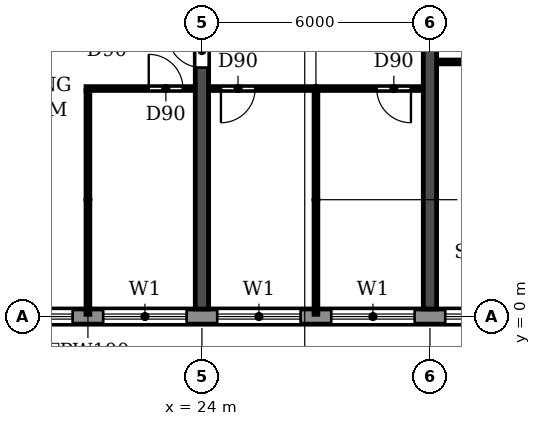
"""IFC4 building model, lengths in metres.
Left out: names, types, materials, properties, quantities, classifications, styles, units other than length and angle.
Written with IfcOpenShell. Run it as: python <this file> out.ifc"""

import sys

from ifc_helpers import new_model, si_unit, direction, frame, frame_2d, origin, place, context, subcontext, project, spatial, rectangle, extrude, element, fill, save


model = new_model("IFC4")
c1 = context("Model", 3, precision=1e-05, world=origin(), true_north=direction((0.0, 1.0)))
c2 = subcontext(c1, "Body", "Model", "MODEL_VIEW")
j1 = project(units=[si_unit("LENGTHUNIT", "METRE"), si_unit("PLANEANGLEUNIT", "RADIAN")], contexts=[c1])
p1 = place(None, origin())
s1 = spatial("IfcSite", under=j1, at=p1, CompositionType="ELEMENT")
p2 = place(p1, origin())
s2 = spatial("IfcBuilding", under=s1, at=p2, CompositionType="ELEMENT")
p3 = place(p2, frame((0.0, 0.0, 102.6)))
s3 = spatial("IfcBuildingStorey", under=s2, at=p3, CompositionType="ELEMENT", Elevation=102.6)
p4 = place(p3, frame((24.0, 0.2, 0.0), z_axis=(0.0, 0.0, 1.0), x_axis=(0.0, 1.0, 0.0)))
e1 = element("IfcWall", 1, at=p4, inside=s3, PredefinedType="SHEAR", context=c2, shape_type="SweptSolid", body=[
    extrude(rectangle(XDim=11.675, YDim=0.35, at=frame_2d((5.837, 0.0))), origin(), (0.0, 0.0, 1.0), 3.0),
])
p5 = place(p4, frame((6.35, 0.0, 0.0)))
e2 = element("IfcOpeningElement", 2, at=p5, cuts=e1, PredefinedType="OPENING", context=c2, shape_type="SweptSolid", body=[
    extrude(rectangle(XDim=0.9, YDim=2.1, at=frame_2d((0.45, 1.05))), frame((0.0, 0.185, 0.0), z_axis=(0.0, -1.0, 0.0), x_axis=(1.0, 0.0, 0.0)), (0.0, 0.0, 1.0), 0.37),
])
p6 = place(p3, frame((30.0, 0.2, 0.0), z_axis=(0.0, 0.0, 1.0), x_axis=(0.0, 1.0, 0.0)))
e3 = element("IfcWall", 3, at=p6, inside=s3, PredefinedType="SHEAR", context=c2, shape_type="SweptSolid", body=[
    extrude(rectangle(XDim=11.675, YDim=0.35, at=frame_2d((5.837, 0.0))), origin(), (0.0, 0.0, 1.0), 3.0),
])
p7 = place(p3, frame((10.683, 0.0, 0.0), z_axis=(0.0, 0.0, 1.0), x_axis=(1.0, 0.0, 0.0)))
e4 = element("IfcWall", 4, at=p7, inside=s3, PredefinedType="STANDARD", context=c2, shape_type="SweptSolid", body=[
    extrude(rectangle(XDim=80.634, YDim=0.4, at=frame_2d((40.317, 0.0))), origin(), (0.0, 0.0, 1.0), 3.0),
])
p8 = place(p7, frame((1.717, 0.0, 0.9)))
e5 = element("IfcOpeningElement", 5, at=p8, cuts=e4, PredefinedType="OPENING", context=c2, shape_type="SweptSolid", body=[
    extrude(rectangle(XDim=2.2, YDim=1.5, at=frame_2d((1.1, 0.75))), frame((0.0, 0.21, 0.0), z_axis=(0.0, -1.0, 0.0), x_axis=(1.0, 0.0, 0.0)), (0.0, 0.0, 1.0), 0.42),
])
p9 = place(p7, frame((4.917, 0.0, 0.0)))
e6 = element("IfcOpeningElement", 6, at=p9, cuts=e4, PredefinedType="OPENING", context=c2, shape_type="SweptSolid", body=[
    extrude(rectangle(XDim=1.8, YDim=2.4, at=frame_2d((0.9, 1.2))), frame((0.0, 0.21, 0.0), z_axis=(0.0, -1.0, 0.0), x_axis=(1.0, 0.0, 0.0)), (0.0, 0.0, 1.0), 0.42),
])
p10 = place(p7, frame((7.717, 0.0, 0.9)))
e7 = element("IfcOpeningElement", 7, at=p10, cuts=e4, PredefinedType="OPENING", context=c2, shape_type="SweptSolid", body=[
    extrude(rectangle(XDim=2.2, YDim=1.5, at=frame_2d((1.1, 0.75))), frame((0.0, 0.21, 0.0), z_axis=(0.0, -1.0, 0.0), x_axis=(1.0, 0.0, 0.0)), (0.0, 0.0, 1.0), 0.42),
])
p11 = place(p7, frame((10.717, 0.0, 0.9)))
e8 = element("IfcOpeningElement", 8, at=p11, cuts=e4, PredefinedType="OPENING", context=c2, shape_type="SweptSolid", body=[
    extrude(rectangle(XDim=2.2, YDim=1.5, at=frame_2d((1.1, 0.75))), frame((0.0, 0.21, 0.0), z_axis=(0.0, -1.0, 0.0), x_axis=(1.0, 0.0, 0.0)), (0.0, 0.0, 1.0), 0.42),
])
p12 = place(p7, frame((13.717, 0.0, 0.9)))
e9 = element("IfcOpeningElement", 9, at=p12, cuts=e4, PredefinedType="OPENING", context=c2, shape_type="SweptSolid", body=[
    extrude(rectangle(XDim=2.2, YDim=1.5, at=frame_2d((1.1, 0.75))), frame((0.0, 0.21, 0.0), z_axis=(0.0, -1.0, 0.0), x_axis=(1.0, 0.0, 0.0)), (0.0, 0.0, 1.0), 0.42),
])
p13 = place(p7, frame((16.717, 0.0, 0.9)))
e10 = element("IfcOpeningElement", 10, at=p13, cuts=e4, PredefinedType="OPENING", context=c2, shape_type="SweptSolid", body=[
    extrude(rectangle(XDim=2.2, YDim=1.5, at=frame_2d((1.1, 0.75))), frame((0.0, 0.21, 0.0), z_axis=(0.0, -1.0, 0.0), x_axis=(1.0, 0.0, 0.0)), (0.0, 0.0, 1.0), 0.42),
])
p14 = place(p7, frame((19.717, 0.0, 0.9)))
e11 = element("IfcOpeningElement", 11, at=p14, cuts=e4, PredefinedType="OPENING", context=c2, shape_type="SweptSolid", body=[
    extrude(rectangle(XDim=2.2, YDim=1.5, at=frame_2d((1.1, 0.75))), frame((0.0, 0.21, 0.0), z_axis=(0.0, -1.0, 0.0), x_axis=(1.0, 0.0, 0.0)), (0.0, 0.0, 1.0), 0.42),
])
p15 = place(p7, frame((22.717, 0.0, 0.9)))
e12 = element("IfcOpeningElement", 12, at=p15, cuts=e4, PredefinedType="OPENING", context=c2, shape_type="SweptSolid", body=[
    extrude(rectangle(XDim=2.2, YDim=1.5, at=frame_2d((1.1, 0.75))), frame((0.0, 0.21, 0.0), z_axis=(0.0, -1.0, 0.0), x_axis=(1.0, 0.0, 0.0)), (0.0, 0.0, 1.0), 0.42),
])
p16 = place(p7, frame((25.717, 0.0, 0.9)))
e13 = element("IfcOpeningElement", 13, at=p16, cuts=e4, PredefinedType="OPENING", context=c2, shape_type="SweptSolid", body=[
    extrude(rectangle(XDim=2.2, YDim=1.5, at=frame_2d((1.1, 0.75))), frame((0.0, 0.21, 0.0), z_axis=(0.0, -1.0, 0.0), x_axis=(1.0, 0.0, 0.0)), (0.0, 0.0, 1.0), 0.42),
])
p17 = place(p7, frame((28.917, 0.0, 0.0)))
e14 = element("IfcOpeningElement", 14, at=p17, cuts=e4, PredefinedType="OPENING", context=c2, shape_type="SweptSolid", body=[
    extrude(rectangle(XDim=1.8, YDim=2.4, at=frame_2d((0.9, 1.2))), frame((0.0, 0.21, 0.0), z_axis=(0.0, -1.0, 0.0), x_axis=(1.0, 0.0, 0.0)), (0.0, 0.0, 1.0), 0.42),
])
p18 = place(p7, frame((31.717, 0.0, 0.9)))
e15 = element("IfcOpeningElement", 15, at=p18, cuts=e4, PredefinedType="OPENING", context=c2, shape_type="SweptSolid", body=[
    extrude(rectangle(XDim=2.2, YDim=1.5, at=frame_2d((1.1, 0.75))), frame((0.0, 0.21, 0.0), z_axis=(0.0, -1.0, 0.0), x_axis=(1.0, 0.0, 0.0)), (0.0, 0.0, 1.0), 0.42),
])
p19 = place(p7, frame((34.717, 0.0, 0.9)))
e16 = element("IfcOpeningElement", 16, at=p19, cuts=e4, PredefinedType="OPENING", context=c2, shape_type="SweptSolid", body=[
    extrude(rectangle(XDim=2.2, YDim=1.5, at=frame_2d((1.1, 0.75))), frame((0.0, 0.21, 0.0), z_axis=(0.0, -1.0, 0.0), x_axis=(1.0, 0.0, 0.0)), (0.0, 0.0, 1.0), 0.42),
])
p20 = place(p7, frame((37.717, 0.0, 0.9)))
e17 = element("IfcOpeningElement", 17, at=p20, cuts=e4, PredefinedType="OPENING", context=c2, shape_type="SweptSolid", body=[
    extrude(rectangle(XDim=2.2, YDim=1.5, at=frame_2d((1.1, 0.75))), frame((0.0, 0.21, 0.0), z_axis=(0.0, -1.0, 0.0), x_axis=(1.0, 0.0, 0.0)), (0.0, 0.0, 1.0), 0.42),
])
p21 = place(p7, frame((40.717, 0.0, 0.9)))
e18 = element("IfcOpeningElement", 18, at=p21, cuts=e4, PredefinedType="OPENING", context=c2, shape_type="SweptSolid", body=[
    extrude(rectangle(XDim=2.2, YDim=1.5, at=frame_2d((1.1, 0.75))), frame((0.0, 0.21, 0.0), z_axis=(0.0, -1.0, 0.0), x_axis=(1.0, 0.0, 0.0)), (0.0, 0.0, 1.0), 0.42),
])
p22 = place(p7, frame((43.717, 0.0, 0.9)))
e19 = element("IfcOpeningElement", 19, at=p22, cuts=e4, PredefinedType="OPENING", context=c2, shape_type="SweptSolid", body=[
    extrude(rectangle(XDim=2.2, YDim=1.5, at=frame_2d((1.1, 0.75))), frame((0.0, 0.21, 0.0), z_axis=(0.0, -1.0, 0.0), x_axis=(1.0, 0.0, 0.0)), (0.0, 0.0, 1.0), 0.42),
])
p23 = place(p7, frame((46.717, 0.0, 0.9)))
e20 = element("IfcOpeningElement", 20, at=p23, cuts=e4, PredefinedType="OPENING", context=c2, shape_type="SweptSolid", body=[
    extrude(rectangle(XDim=2.2, YDim=1.5, at=frame_2d((1.1, 0.75))), frame((0.0, 0.21, 0.0), z_axis=(0.0, -1.0, 0.0), x_axis=(1.0, 0.0, 0.0)), (0.0, 0.0, 1.0), 0.42),
])
p24 = place(p7, frame((49.917, 0.0, 0.0)))
e21 = element("IfcOpeningElement", 21, at=p24, cuts=e4, PredefinedType="OPENING", context=c2, shape_type="SweptSolid", body=[
    extrude(rectangle(XDim=1.8, YDim=2.4, at=frame_2d((0.9, 1.2))), frame((0.0, 0.21, 0.0), z_axis=(0.0, -1.0, 0.0), x_axis=(1.0, 0.0, 0.0)), (0.0, 0.0, 1.0), 0.42),
])
p25 = place(p7, frame((52.717, 0.0, 0.9)))
e22 = element("IfcOpeningElement", 22, at=p25, cuts=e4, PredefinedType="OPENING", context=c2, shape_type="SweptSolid", body=[
    extrude(rectangle(XDim=2.2, YDim=1.5, at=frame_2d((1.1, 0.75))), frame((0.0, 0.21, 0.0), z_axis=(0.0, -1.0, 0.0), x_axis=(1.0, 0.0, 0.0)), (0.0, 0.0, 1.0), 0.42),
])
p26 = place(p7, frame((55.717, 0.0, 0.9)))
e23 = element("IfcOpeningElement", 23, at=p26, cuts=e4, PredefinedType="OPENING", context=c2, shape_type="SweptSolid", body=[
    extrude(rectangle(XDim=2.2, YDim=1.5, at=frame_2d((1.1, 0.75))), frame((0.0, 0.21, 0.0), z_axis=(0.0, -1.0, 0.0), x_axis=(1.0, 0.0, 0.0)), (0.0, 0.0, 1.0), 0.42),
])
p27 = place(p7, frame((58.717, 0.0, 0.9)))
e24 = element("IfcOpeningElement", 24, at=p27, cuts=e4, PredefinedType="OPENING", context=c2, shape_type="SweptSolid", body=[
    extrude(rectangle(XDim=2.2, YDim=1.5, at=frame_2d((1.1, 0.75))), frame((0.0, 0.21, 0.0), z_axis=(0.0, -1.0, 0.0), x_axis=(1.0, 0.0, 0.0)), (0.0, 0.0, 1.0), 0.42),
])
p28 = place(p7, frame((61.717, 0.0, 0.9)))
e25 = element("IfcOpeningElement", 25, at=p28, cuts=e4, PredefinedType="OPENING", context=c2, shape_type="SweptSolid", body=[
    extrude(rectangle(XDim=2.2, YDim=1.5, at=frame_2d((1.1, 0.75))), frame((0.0, 0.21, 0.0), z_axis=(0.0, -1.0, 0.0), x_axis=(1.0, 0.0, 0.0)), (0.0, 0.0, 1.0), 0.42),
])
p29 = place(p7, frame((64.717, 0.0, 0.9)))
e26 = element("IfcOpeningElement", 26, at=p29, cuts=e4, PredefinedType="OPENING", context=c2, shape_type="SweptSolid", body=[
    extrude(rectangle(XDim=2.2, YDim=1.5, at=frame_2d((1.1, 0.75))), frame((0.0, 0.21, 0.0), z_axis=(0.0, -1.0, 0.0), x_axis=(1.0, 0.0, 0.0)), (0.0, 0.0, 1.0), 0.42),
])
p30 = place(p7, frame((67.717, 0.0, 0.9)))
e27 = element("IfcOpeningElement", 27, at=p30, cuts=e4, PredefinedType="OPENING", context=c2, shape_type="SweptSolid", body=[
    extrude(rectangle(XDim=2.2, YDim=1.5, at=frame_2d((1.1, 0.75))), frame((0.0, 0.21, 0.0), z_axis=(0.0, -1.0, 0.0), x_axis=(1.0, 0.0, 0.0)), (0.0, 0.0, 1.0), 0.42),
])
p31 = place(p7, frame((70.717, 0.0, 0.9)))
e28 = element("IfcOpeningElement", 28, at=p31, cuts=e4, PredefinedType="OPENING", context=c2, shape_type="SweptSolid", body=[
    extrude(rectangle(XDim=2.2, YDim=1.5, at=frame_2d((1.1, 0.75))), frame((0.0, 0.21, 0.0), z_axis=(0.0, -1.0, 0.0), x_axis=(1.0, 0.0, 0.0)), (0.0, 0.0, 1.0), 0.42),
])
p32 = place(p7, frame((73.717, 0.0, 0.9)))
e29 = element("IfcOpeningElement", 29, at=p32, cuts=e4, PredefinedType="OPENING", context=c2, shape_type="SweptSolid", body=[
    extrude(rectangle(XDim=2.2, YDim=1.5, at=frame_2d((1.1, 0.75))), frame((0.0, 0.21, 0.0), z_axis=(0.0, -1.0, 0.0), x_axis=(1.0, 0.0, 0.0)), (0.0, 0.0, 1.0), 0.42),
])
p33 = place(p7, frame((76.917, 0.0, 0.0)))
e30 = element("IfcOpeningElement", 30, at=p33, cuts=e4, PredefinedType="OPENING", context=c2, shape_type="SweptSolid", body=[
    extrude(rectangle(XDim=1.8, YDim=2.4, at=frame_2d((0.9, 1.2))), frame((0.0, 0.21, 0.0), z_axis=(0.0, -1.0, 0.0), x_axis=(1.0, 0.0, 0.0)), (0.0, 0.0, 1.0), 0.42),
])
p34 = place(p3, frame((20.95, 6.0, 0.0), z_axis=(0.0, 0.0, 1.0), x_axis=(1.0, 0.0, 0.0)))
e31 = element("IfcWall", 31, at=p34, inside=s3, PredefinedType="PARTITIONING", context=c2, shape_type="SweptSolid", body=[
    extrude(rectangle(XDim=2.865, YDim=0.1, at=frame_2d((1.433, 0.0))), origin(), (0.0, 0.0, 1.0), 3.0),
])
p35 = place(p34, frame((1.65, 0.0, 0.0)))
e32 = element("IfcOpeningElement", 32, at=p35, cuts=e31, PredefinedType="OPENING", context=c2, shape_type="SweptSolid", body=[
    extrude(rectangle(XDim=0.9, YDim=2.1, at=frame_2d((0.45, 1.05))), frame((0.0, 0.06, 0.0), z_axis=(0.0, -1.0, 0.0), x_axis=(1.0, 0.0, 0.0)), (0.0, 0.0, 1.0), 0.12),
])
p36 = place(p3, frame((24.185, 6.0, 0.0), z_axis=(0.0, 0.0, 1.0), x_axis=(1.0, 0.0, 0.0)))
e33 = element("IfcWall", 33, at=p36, inside=s3, PredefinedType="PARTITIONING", context=c2, shape_type="SweptSolid", body=[
    extrude(rectangle(XDim=5.63, YDim=0.1, at=frame_2d((2.815, 0.0))), origin(), (0.0, 0.0, 1.0), 3.0),
])
p37 = place(p36, frame((0.315, 0.0, 0.0)))
e34 = element("IfcOpeningElement", 34, at=p37, cuts=e33, PredefinedType="OPENING", context=c2, shape_type="SweptSolid", body=[
    extrude(rectangle(XDim=0.9, YDim=2.1, at=frame_2d((0.45, 1.05))), frame((0.0, 0.06, 0.0), z_axis=(0.0, -1.0, 0.0), x_axis=(1.0, 0.0, 0.0)), (0.0, 0.0, 1.0), 0.12),
])
p38 = place(p36, frame((4.415, 0.0, 0.0)))
e35 = element("IfcOpeningElement", 35, at=p38, cuts=e33, PredefinedType="OPENING", context=c2, shape_type="SweptSolid", body=[
    extrude(rectangle(XDim=0.9, YDim=2.1, at=frame_2d((0.45, 1.05))), frame((0.0, 0.06, 0.0), z_axis=(0.0, -1.0, 0.0), x_axis=(1.0, 0.0, 0.0)), (0.0, 0.0, 1.0), 0.12),
])
p39 = place(p3, frame((30.185, 6.7, 0.0), z_axis=(0.0, 0.0, 1.0), x_axis=(1.0, 0.0, 0.0)))
e36 = element("IfcWall", 36, at=p39, inside=s3, PredefinedType="PARTITIONING", context=c2, shape_type="SweptSolid", body=[
    extrude(rectangle(XDim=1.915, YDim=0.1, at=frame_2d((0.958, 0.0))), origin(), (0.0, 0.0, 1.0), 3.0),
])
for number, where, z_axis, x_axis in (
    (37, (21.0, 0.06, 0.0), (0.0, 0.0, 1.0), (0.0, 1.0, 0.0)),
    (38, (27.0, 0.06, 0.0), (0.0, 0.0, 1.0), (0.0, 1.0, 0.0)),
):
    element("IfcWall", number, at=place(p3, frame(where, z_axis=z_axis, x_axis=x_axis)), inside=s3, PredefinedType="PARTITIONING", context=c2, shape_type="SweptSolid", body=[
        extrude(rectangle(XDim=5.89, YDim=0.1, at=frame_2d((2.945, 0.0))), origin(), (0.0, 0.0, 1.0), 3.0),
    ])
p40 = place(p10, origin())
e39 = element("IfcWindow", 39, at=p40, inside=s3, PartitioningType="DOUBLE_PANEL_HORIZONTAL", PredefinedType="WINDOW", context=c2, shape_type="SweptSolid", body=[
    extrude(rectangle(XDim=2.2, YDim=1.5, at=frame_2d((1.1, 0.75))), frame((0.0, 0.03, 0.0), z_axis=(0.0, -1.0, 0.0), x_axis=(1.0, 0.0, 0.0)), (0.0, 0.0, 1.0), 0.06),
])
fill(e7, e39)
p41 = place(p11, origin())
e40 = element("IfcWindow", 40, at=p41, inside=s3, PartitioningType="DOUBLE_PANEL_HORIZONTAL", PredefinedType="WINDOW", context=c2, shape_type="SweptSolid", body=[
    extrude(rectangle(XDim=2.2, YDim=1.5, at=frame_2d((1.1, 0.75))), frame((0.0, 0.03, 0.0), z_axis=(0.0, -1.0, 0.0), x_axis=(1.0, 0.0, 0.0)), (0.0, 0.0, 1.0), 0.06),
])
fill(e8, e40)
p42 = place(p12, origin())
e41 = element("IfcWindow", 41, at=p42, inside=s3, PartitioningType="DOUBLE_PANEL_HORIZONTAL", PredefinedType="WINDOW", context=c2, shape_type="SweptSolid", body=[
    extrude(rectangle(XDim=2.2, YDim=1.5, at=frame_2d((1.1, 0.75))), frame((0.0, 0.03, 0.0), z_axis=(0.0, -1.0, 0.0), x_axis=(1.0, 0.0, 0.0)), (0.0, 0.0, 1.0), 0.06),
])
fill(e9, e41)
p43 = place(p13, origin())
e42 = element("IfcWindow", 42, at=p43, inside=s3, PartitioningType="DOUBLE_PANEL_HORIZONTAL", PredefinedType="WINDOW", context=c2, shape_type="SweptSolid", body=[
    extrude(rectangle(XDim=2.2, YDim=1.5, at=frame_2d((1.1, 0.75))), frame((0.0, 0.03, 0.0), z_axis=(0.0, -1.0, 0.0), x_axis=(1.0, 0.0, 0.0)), (0.0, 0.0, 1.0), 0.06),
])
fill(e10, e42)
p44 = place(p14, origin())
e43 = element("IfcWindow", 43, at=p44, inside=s3, PartitioningType="DOUBLE_PANEL_HORIZONTAL", PredefinedType="WINDOW", context=c2, shape_type="SweptSolid", body=[
    extrude(rectangle(XDim=2.2, YDim=1.5, at=frame_2d((1.1, 0.75))), frame((0.0, 0.03, 0.0), z_axis=(0.0, -1.0, 0.0), x_axis=(1.0, 0.0, 0.0)), (0.0, 0.0, 1.0), 0.06),
])
fill(e11, e43)
p45 = place(p37, frame((0.9, 0.0, 0.0), z_axis=(0.0, 0.0, 1.0), x_axis=(-1.0, 0.0, 0.0)))
e44 = element("IfcDoor", 44, at=p45, inside=s3, OperationType="SINGLE_SWING_RIGHT", PredefinedType="DOOR", context=c2, shape_type="SweptSolid", body=[
    extrude(rectangle(XDim=0.9, YDim=2.1, at=frame_2d((0.45, 1.05))), frame((0.0, 0.025, 0.0), z_axis=(0.0, -1.0, 0.0), x_axis=(1.0, 0.0, 0.0)), (0.0, 0.0, 1.0), 0.05),
])
fill(e34, e44)
p46 = place(p38, frame((0.9, 0.0, 0.0), z_axis=(0.0, 0.0, 1.0), x_axis=(-1.0, 0.0, 0.0)))
e45 = element("IfcDoor", 45, at=p46, inside=s3, OperationType="SINGLE_SWING_LEFT", PredefinedType="DOOR", context=c2, shape_type="SweptSolid", body=[
    extrude(rectangle(XDim=0.9, YDim=2.1, at=frame_2d((0.45, 1.05))), frame((0.0, 0.025, 0.0), z_axis=(0.0, -1.0, 0.0), x_axis=(1.0, 0.0, 0.0)), (0.0, 0.0, 1.0), 0.05),
])
fill(e35, e45)
p47 = place(p35, origin())
e46 = element("IfcDoor", 46, at=p47, inside=s3, OperationType="SINGLE_SWING_LEFT", PredefinedType="DOOR", context=c2, shape_type="SweptSolid", body=[
    extrude(rectangle(XDim=0.9, YDim=2.1, at=frame_2d((0.45, 1.05))), frame((0.0, 0.025, 0.0), z_axis=(0.0, -1.0, 0.0), x_axis=(1.0, 0.0, 0.0)), (0.0, 0.0, 1.0), 0.05),
])
fill(e32, e46)
p48 = place(p5, origin())
e47 = element("IfcDoor", 47, at=p48, inside=s3, OperationType="SINGLE_SWING_RIGHT", PredefinedType="DOOR", context=c2, shape_type="SweptSolid", body=[
    extrude(rectangle(XDim=0.9, YDim=2.1, at=frame_2d((0.45, 1.05))), frame((0.0, 0.025, 0.0), z_axis=(0.0, -1.0, 0.0), x_axis=(1.0, 0.0, 0.0)), (0.0, 0.0, 1.0), 0.05),
])
fill(e2, e47)
save(model, sys.argv[1])
